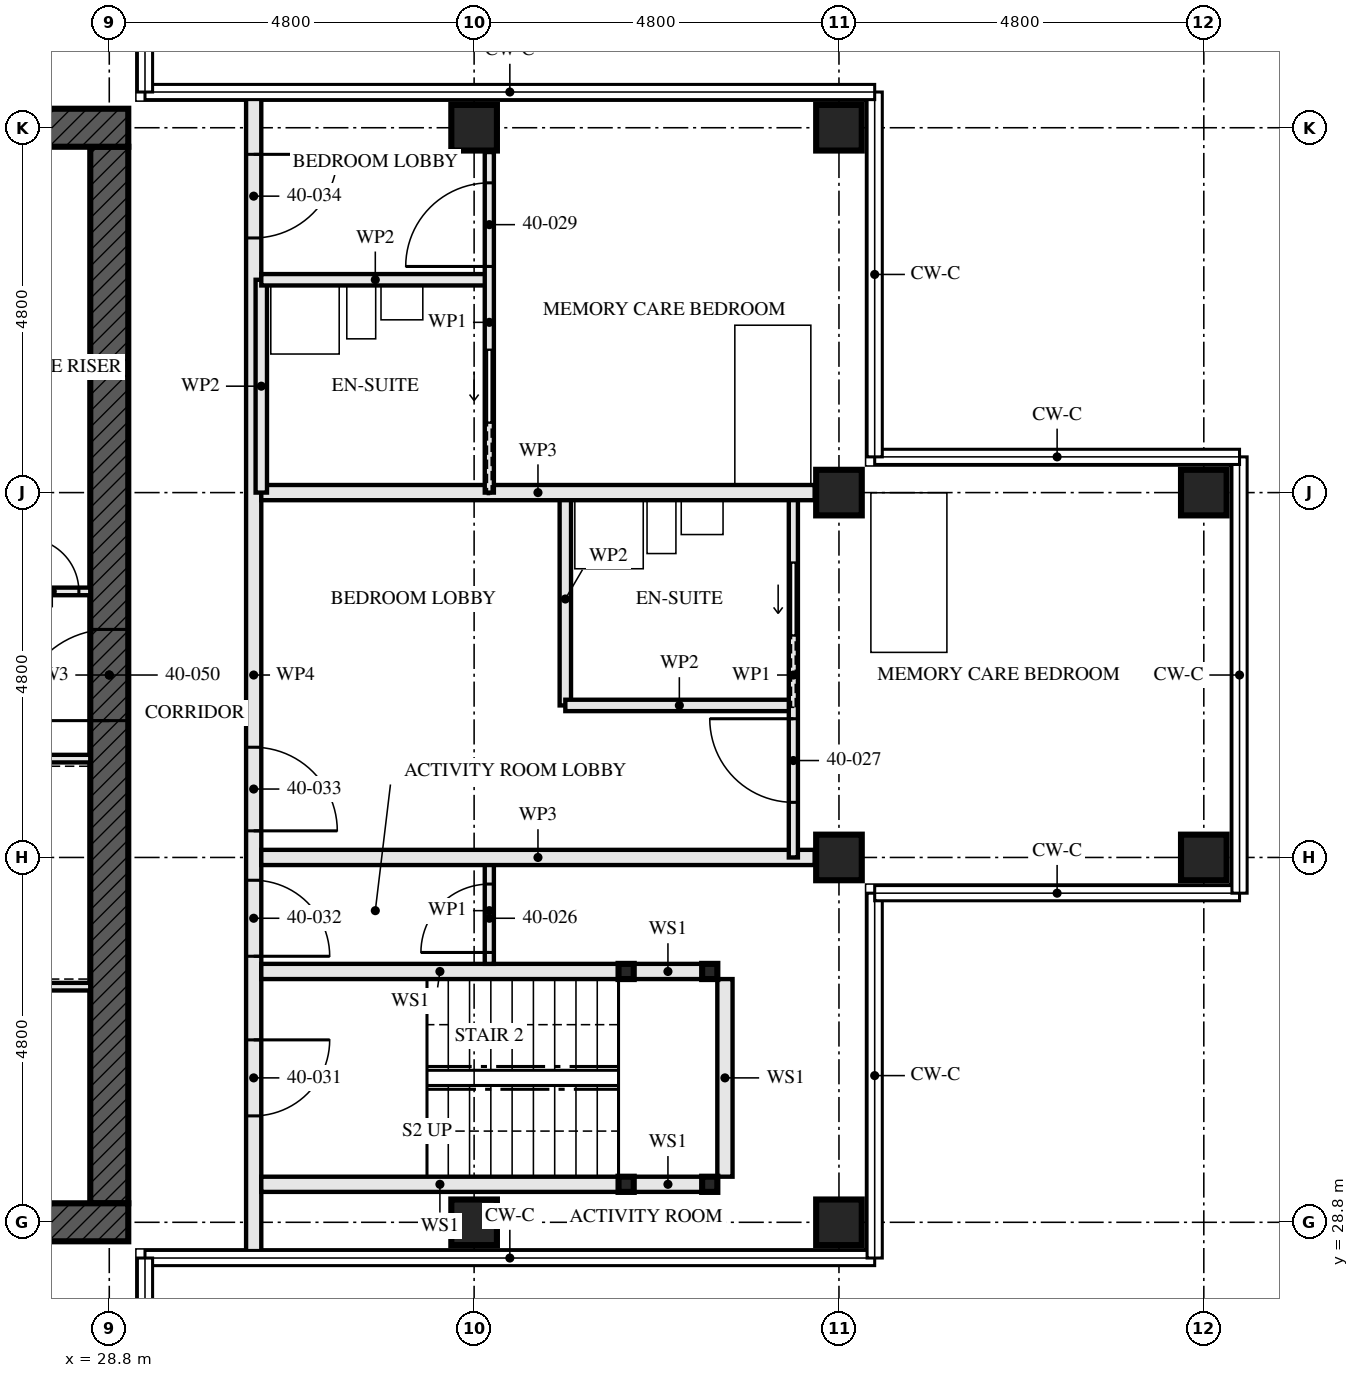
"""IFC4 building model, lengths in metres.
Left out: names, types, materials, properties, quantities, classifications, styles, units other than length and angle.
Written with IfcOpenShell. Run it as: python <this file> out.ifc"""

import sys

from ifc_helpers import new_model, si_unit, direction, frame, frame_2d, origin, origin_2d, place, context, subcontext, project, spatial, rectangle, hollow_rectangle, extrude, element, fill, save


model = new_model("IFC4")
c1 = context("Model", 3, precision=1e-05, world=origin(), true_north=direction((0.0, 1.0)))
c2 = subcontext(c1, "Body", "Model", "MODEL_VIEW")
j1 = project(units=[si_unit("LENGTHUNIT", "METRE"), si_unit("PLANEANGLEUNIT", "RADIAN")], contexts=[c1])
p1 = place(None, origin())
s1 = spatial("IfcSite", under=j1, at=p1, CompositionType="ELEMENT")
p2 = place(p1, origin())
s2 = spatial("IfcBuilding", under=s1, at=p2, CompositionType="ELEMENT")
p3 = place(p2, frame((0.0, 0.0, 148.0)))
s3 = spatial("IfcBuildingStorey", under=s2, at=p3, CompositionType="ELEMENT", Elevation=148.0)
for number, where, z_axis, x_axis in (
    (1, (33.6, 28.8, 0.0), (0.0, 0.0, 1.0), (0.0, 1.0, 0.0)),
    (2, (33.6, 43.2, 0.0), (0.0, 0.0, 1.0), (0.0, 1.0, 0.0)),
    (3, (38.4, 28.8, 0.0), (0.0, 0.0, 1.0), (0.0, 1.0, 0.0)),
    (4, (38.4, 33.6, 0.0), (0.0, 0.0, 1.0), (0.0, 1.0, 0.0)),
    (5, (38.4, 38.4, 0.0), (0.0, 0.0, 1.0), (0.0, 1.0, 0.0)),
    (6, (38.4, 43.2, 0.0), (0.0, 0.0, 1.0), (0.0, 1.0, 0.0)),
    (7, (43.2, 33.6, 0.0), (0.0, 0.0, 1.0), (0.0, 1.0, 0.0)),
    (8, (43.2, 38.4, 0.0), (0.0, 0.0, 1.0), (0.0, 1.0, 0.0)),
):
    element("IfcColumn", number, at=place(p3, frame(where, z_axis=z_axis, x_axis=x_axis)), inside=s3, PredefinedType="COLUMN", context=c2, shape_type="SweptSolid", body=[
        extrude(hollow_rectangle(XDim=0.6, YDim=0.6, WallThickness=0.08, at=origin_2d()), origin(), (0.0, 0.0, 1.0), 3.5),
    ])
p4 = place(p3, frame((14.15, 28.8, -0.17), z_axis=(0.0, 0.0, 1.0), x_axis=(1.0, 0.0, 0.0)))
e9 = element("IfcWall", 9, at=p4, inside=s3, PredefinedType="SHEAR", context=c2, shape_type="SweptSolid", body=[
    extrude(rectangle(XDim=14.9, YDim=0.5, at=frame_2d((7.45, 0.0))), origin(), (0.0, 0.0, 1.0), 3.5),
])
p5 = place(p4, frame((6.85, 0.0, 0.17)))
e10 = element("IfcOpeningElement", 10, at=p5, cuts=e9, PredefinedType="OPENING", context=c2, shape_type="SweptSolid", body=[
    extrude(rectangle(XDim=1.2, YDim=2.1, at=frame_2d((0.6, 1.05))), frame((0.0, 0.26, 0.0), z_axis=(0.0, -1.0, 0.0), x_axis=(1.0, 0.0, 0.0)), (0.0, 0.0, 1.0), 0.521),
])
p6 = place(p3, frame((29.05, 43.2, -0.17), z_axis=(0.0, 0.0, 1.0), x_axis=(-1.0, 0.0, 0.0)))
e11 = element("IfcWall", 11, at=p6, inside=s3, PredefinedType="SHEAR", context=c2, shape_type="SweptSolid", body=[
    extrude(rectangle(XDim=14.9, YDim=0.5, at=frame_2d((7.45, 0.0))), origin(), (0.0, 0.0, 1.0), 3.5),
])
p7 = place(p6, frame((6.85, 0.0, 0.17)))
e12 = element("IfcOpeningElement", 12, at=p7, cuts=e11, PredefinedType="OPENING", context=c2, shape_type="SweptSolid", body=[
    extrude(rectangle(XDim=1.2, YDim=2.1, at=frame_2d((0.6, 1.05))), frame((0.0, 0.26, 0.0), z_axis=(0.0, -1.0, 0.0), x_axis=(1.0, 0.0, 0.0)), (0.0, 0.0, 1.0), 0.521),
])
p8 = place(p3, frame((28.8, 29.05, -0.17), z_axis=(0.0, 0.0, 1.0), x_axis=(0.0, 1.0, 0.0)))
e13 = element("IfcWall", 13, at=p8, inside=s3, PredefinedType="SHEAR", context=c2, shape_type="SweptSolid", body=[
    extrude(rectangle(XDim=13.9, YDim=0.5, at=frame_2d((6.95, 0.0))), origin(), (0.0, 0.0, 1.0), 3.5),
])
p9 = place(p8, frame((6.35, 0.0, 0.17)))
e14 = element("IfcOpeningElement", 14, at=p9, cuts=e13, PredefinedType="OPENING", context=c2, shape_type="SweptSolid", body=[
    extrude(rectangle(XDim=1.2, YDim=2.1, at=frame_2d((0.6, 1.05))), frame((0.0, 0.26, 0.0), z_axis=(0.0, -1.0, 0.0), x_axis=(1.0, 0.0, 0.0)), (0.0, 0.0, 1.0), 0.521),
])
for number, where, z_axis, x_axis in (
    (15, (36.7, 29.3, 0.0), (0.0, 0.0, 1.0), (1.0, 0.0, 0.0)),
    (16, (36.7, 32.1, 0.0), (0.0, 0.0, 1.0), (1.0, 0.0, 0.0)),
    (17, (35.6, 29.3, 0.0), (0.0, 0.0, 1.0), (1.0, 0.0, 0.0)),
    (18, (35.6, 32.1, 0.0), (0.0, 0.0, 1.0), (1.0, 0.0, 0.0)),
):
    element("IfcColumn", number, at=place(p3, frame(where, z_axis=z_axis, x_axis=x_axis)), inside=s3, PredefinedType="COLUMN", context=c2, shape_type="SweptSolid", body=[
        extrude(hollow_rectangle(XDim=0.2, YDim=0.2, WallThickness=0.008, at=origin_2d()), origin(), (0.0, 0.0, 1.0), 3.33),
    ])
p10 = place(p3, frame((36.6, 29.3, 0.0), z_axis=(0.0, 0.0, 1.0), x_axis=(-1.0, 0.0, 0.0)))
e19 = element("IfcWall", 19, at=p10, inside=s3, PredefinedType="SOLIDWALL", context=c2, shape_type="SweptSolid", body=[
    extrude(rectangle(XDim=0.9, YDim=0.2, at=frame_2d((0.45, 0.0))), origin(), (0.0, 0.0, 1.0), 2.99),
])
p11 = place(p3, frame((35.5, 29.3, 0.0), z_axis=(0.0, 0.0, 1.0), x_axis=(-1.0, 0.0, 0.0)))
e20 = element("IfcWall", 20, at=p11, inside=s3, PredefinedType="SOLIDWALL", context=c2, shape_type="SweptSolid", body=[
    extrude(rectangle(XDim=4.7, YDim=0.2, at=frame_2d((2.35, 0.0))), origin(), (0.0, 0.0, 1.0), 2.99),
])
p12 = place(p3, frame((36.6, 32.1, 0.0), z_axis=(0.0, 0.0, 1.0), x_axis=(-1.0, 0.0, 0.0)))
e21 = element("IfcWall", 21, at=p12, inside=s3, PredefinedType="SOLIDWALL", context=c2, shape_type="SweptSolid", body=[
    extrude(rectangle(XDim=0.9, YDim=0.2, at=frame_2d((0.45, 0.0))), origin(), (0.0, 0.0, 1.0), 2.99),
])
p13 = place(p3, frame((35.5, 32.1, 0.0), z_axis=(0.0, 0.0, 1.0), x_axis=(-1.0, 0.0, 0.0)))
e22 = element("IfcWall", 22, at=p13, inside=s3, PredefinedType="SOLIDWALL", context=c2, shape_type="SweptSolid", body=[
    extrude(rectangle(XDim=4.7, YDim=0.2, at=frame_2d((2.35, 0.0))), origin(), (0.0, 0.0, 1.0), 2.99),
])
p14 = place(p3, frame((36.9, 29.4, 0.0), z_axis=(0.0, 0.0, 1.0), x_axis=(0.0, 1.0, 0.0)))
e23 = element("IfcWall", 23, at=p14, inside=s3, PredefinedType="SOLIDWALL", context=c2, shape_type="SweptSolid", body=[
    extrude(rectangle(XDim=2.6, YDim=0.2, at=frame_2d((1.3, 0.0))), origin(), (0.0, 0.0, 1.0), 3.33),
])
p15 = place(p3, frame((33.8, 32.2, 0.0), z_axis=(0.0, 0.0, 1.0), x_axis=(0.0, 1.0, 0.0)))
e24 = element("IfcWall", 24, at=p15, inside=s3, PredefinedType="PARTITIONING", context=c2, shape_type="SweptSolid", body=[
    extrude(rectangle(XDim=1.4, YDim=0.12, at=frame_2d((0.7, 0.0))), origin(), (0.0, 0.0, 1.0), 3.33),
])
p16 = place(p15, frame((0.15, 0.0, 0.0)))
e25 = element("IfcOpeningElement", 25, at=p16, cuts=e24, PredefinedType="OPENING", context=c2, shape_type="SweptSolid", body=[
    extrude(rectangle(XDim=0.9, YDim=2.1, at=frame_2d((0.45, 1.05))), frame((0.0, 0.071, 0.0), z_axis=(0.0, -1.0, 0.0), x_axis=(1.0, 0.0, 0.0)), (0.0, 0.0, 1.0), 0.141),
])
p17 = place(p3, frame((38.08, 33.6, 0.0), z_axis=(0.0, 0.0, 1.0), x_axis=(-1.0, 0.0, 0.0)))
e26 = element("IfcWall", 26, at=p17, inside=s3, PredefinedType="PARTITIONING", context=c2, shape_type="SweptSolid", body=[
    extrude(rectangle(XDim=7.28, YDim=0.2, at=frame_2d((3.64, 0.0))), origin(), (0.0, 0.0, 1.0), 2.55),
])
p18 = place(p3, frame((37.8, 35.6, 0.0), z_axis=(0.0, 0.0, 1.0), x_axis=(-1.0, 0.0, 0.0)))
e27 = element("IfcWall", 27, at=p18, inside=s3, PredefinedType="PARTITIONING", context=c2, shape_type="SweptSolid", body=[
    extrude(rectangle(XDim=3.0, YDim=0.15, at=frame_2d((1.5, 0.0))), origin(), (0.0, 0.0, 1.0), 3.33),
])
p19 = place(p3, frame((34.8, 35.6, 0.0), z_axis=(0.0, 0.0, 1.0), x_axis=(0.0, 1.0, 0.0)))
e28 = element("IfcWall", 28, at=p19, inside=s3, PredefinedType="PARTITIONING", context=c2, shape_type="SweptSolid", body=[
    extrude(rectangle(XDim=2.8, YDim=0.15, at=frame_2d((1.4, 0.0))), origin(), (0.0, 0.0, 1.0), 3.33),
])
p20 = place(p3, frame((37.8, 33.6, 0.0), z_axis=(0.0, 0.0, 1.0), x_axis=(0.0, 1.0, 0.0)))
e29 = element("IfcWall", 29, at=p20, inside=s3, PredefinedType="PARTITIONING", context=c2, shape_type="SweptSolid", body=[
    extrude(rectangle(XDim=4.8, YDim=0.12, at=frame_2d((2.4, 0.0))), origin(), (0.0, 0.0, 1.0), 3.33),
])
p21 = place(p20, frame((0.725, 0.0, 0.0)))
e30 = element("IfcOpeningElement", 30, at=p21, cuts=e29, PredefinedType="OPENING", context=c2, shape_type="SweptSolid", body=[
    extrude(rectangle(XDim=1.1, YDim=2.1, at=frame_2d((0.55, 1.05))), frame((0.0, 0.071, 0.0), z_axis=(0.0, -1.0, 0.0), x_axis=(1.0, 0.0, 0.0)), (0.0, 0.0, 1.0), 0.141),
])
p22 = place(p20, frame((2.925, 0.0, 0.0)))
e31 = element("IfcOpeningElement", 31, at=p22, cuts=e29, PredefinedType="OPENING", context=c2, shape_type="SweptSolid", body=[
    extrude(rectangle(XDim=0.95, YDim=2.1, at=frame_2d((0.475, 1.05))), frame((0.0, 0.071, 0.0), z_axis=(0.0, -1.0, 0.0), x_axis=(1.0, 0.0, 0.0)), (0.0, 0.0, 1.0), 0.141),
])
p23 = place(p3, frame((38.08, 38.4, 0.0), z_axis=(0.0, 0.0, 1.0), x_axis=(-1.0, 0.0, 0.0)))
e32 = element("IfcWall", 32, at=p23, inside=s3, PredefinedType="PARTITIONING", context=c2, shape_type="SweptSolid", body=[
    extrude(rectangle(XDim=7.28, YDim=0.2, at=frame_2d((3.64, 0.0))), origin(), (0.0, 0.0, 1.0), 2.55),
])
p24 = place(p3, frame((33.8, 41.2, 0.0), z_axis=(0.0, 0.0, 1.0), x_axis=(-1.0, 0.0, 0.0)))
e33 = element("IfcWall", 33, at=p24, inside=s3, PredefinedType="PARTITIONING", context=c2, shape_type="SweptSolid", body=[
    extrude(rectangle(XDim=3.0, YDim=0.15, at=frame_2d((1.5, 0.0))), origin(), (0.0, 0.0, 1.0), 3.33),
])
p25 = place(p3, frame((30.8, 38.4, 0.0), z_axis=(0.0, 0.0, 1.0), x_axis=(0.0, 1.0, 0.0)))
e34 = element("IfcWall", 34, at=p25, inside=s3, PredefinedType="PARTITIONING", context=c2, shape_type="SweptSolid", body=[
    extrude(rectangle(XDim=2.8, YDim=0.15, at=frame_2d((1.4, 0.0))), origin(), (0.0, 0.0, 1.0), 3.33),
])
p26 = place(p3, frame((33.8, 38.4, 0.0), z_axis=(0.0, 0.0, 1.0), x_axis=(0.0, 1.0, 0.0)))
e35 = element("IfcWall", 35, at=p26, inside=s3, PredefinedType="PARTITIONING", context=c2, shape_type="SweptSolid", body=[
    extrude(rectangle(XDim=4.48, YDim=0.12, at=frame_2d((2.24, 0.0))), origin(), (0.0, 0.0, 1.0), 3.33),
])
p27 = place(p26, frame((2.975, 0.0, 0.0)))
e36 = element("IfcOpeningElement", 36, at=p27, cuts=e35, PredefinedType="OPENING", context=c2, shape_type="SweptSolid", body=[
    extrude(rectangle(XDim=1.1, YDim=2.1, at=frame_2d((0.55, 1.05))), frame((0.0, 0.071, 0.0), z_axis=(0.0, -1.0, 0.0), x_axis=(1.0, 0.0, 0.0)), (0.0, 0.0, 1.0), 0.141),
])
p28 = place(p26, frame((0.925, 0.0, 0.0)))
e37 = element("IfcOpeningElement", 37, at=p28, cuts=e35, PredefinedType="OPENING", context=c2, shape_type="SweptSolid", body=[
    extrude(rectangle(XDim=0.95, YDim=2.1, at=frame_2d((0.475, 1.05))), frame((0.0, 0.071, 0.0), z_axis=(0.0, -1.0, 0.0), x_axis=(1.0, 0.0, 0.0)), (0.0, 0.0, 1.0), 0.141),
])
p29 = place(p3, frame((30.7, 28.35, 0.0), z_axis=(0.0, 0.0, 1.0), x_axis=(0.0, 1.0, 0.0)))
e38 = element("IfcWall", 38, at=p29, inside=s3, PredefinedType="PARTITIONING", context=c2, shape_type="SweptSolid", body=[
    extrude(rectangle(XDim=15.3, YDim=0.2, at=frame_2d((7.65, 0.0))), origin(), (0.0, 0.0, 1.0), 2.32),
])
p30 = place(p29, frame((1.85, 0.0, 0.0)))
e39 = element("IfcOpeningElement", 39, at=p30, cuts=e38, PredefinedType="OPENING", context=c2, shape_type="SweptSolid", body=[
    extrude(rectangle(XDim=1.0, YDim=2.1, at=frame_2d((0.5, 1.05))), frame((0.0, 0.111, 0.0), z_axis=(0.0, -1.0, 0.0), x_axis=(1.0, 0.0, 0.0)), (0.0, 0.0, 1.0), 0.221),
])
p31 = place(p29, frame((3.95, 0.0, 0.0)))
e40 = element("IfcOpeningElement", 40, at=p31, cuts=e38, PredefinedType="OPENING", context=c2, shape_type="SweptSolid", body=[
    extrude(rectangle(XDim=1.0, YDim=2.1, at=frame_2d((0.5, 1.05))), frame((0.0, 0.111, 0.0), z_axis=(0.0, -1.0, 0.0), x_axis=(1.0, 0.0, 0.0)), (0.0, 0.0, 1.0), 0.221),
])
p32 = place(p29, frame((5.6, 0.0, 0.0)))
e41 = element("IfcOpeningElement", 41, at=p32, cuts=e38, PredefinedType="OPENING", context=c2, shape_type="SweptSolid", body=[
    extrude(rectangle(XDim=1.1, YDim=2.1, at=frame_2d((0.55, 1.05))), frame((0.0, 0.111, 0.0), z_axis=(0.0, -1.0, 0.0), x_axis=(1.0, 0.0, 0.0)), (0.0, 0.0, 1.0), 0.221),
])
p33 = place(p29, frame((13.4, 0.0, 0.0)))
e42 = element("IfcOpeningElement", 42, at=p33, cuts=e38, PredefinedType="OPENING", context=c2, shape_type="SweptSolid", body=[
    extrude(rectangle(XDim=1.1, YDim=2.1, at=frame_2d((0.55, 1.05))), frame((0.0, 0.111, 0.0), z_axis=(0.0, -1.0, 0.0), x_axis=(1.0, 0.0, 0.0)), (0.0, 0.0, 1.0), 0.221),
])
p34 = place(p3, frame((23.05, 34.9, 0.0), z_axis=(0.0, 0.0, 1.0), x_axis=(1.0, 0.0, 0.0)))
e43 = element("IfcWall", 43, at=p34, inside=s3, PredefinedType="SOLIDWALL", context=c2, shape_type="SweptSolid", body=[
    extrude(rectangle(XDim=5.5, YDim=0.1, at=frame_2d((2.75, 0.0))), origin(), (0.0, 0.0, 1.0), 3.33),
])
p35 = place(p34, frame((0.85, 0.0, 0.0)))
e44 = element("IfcOpeningElement", 44, at=p35, cuts=e43, PredefinedType="OPENING", context=c2, shape_type="SweptSolid", body=[
    extrude(rectangle(XDim=1.0, YDim=2.1, at=frame_2d((0.5, 1.05))), frame((0.0, 0.061, 0.0), z_axis=(0.0, -1.0, 0.0), x_axis=(1.0, 0.0, 0.0)), (0.0, 0.0, 1.0), 0.121),
])
p36 = place(p34, frame((3.625, 0.0, 0.0)))
e45 = element("IfcOpeningElement", 45, at=p36, cuts=e43, PredefinedType="OPENING", context=c2, shape_type="SweptSolid", body=[
    extrude(rectangle(XDim=1.0, YDim=2.1, at=frame_2d((0.5, 1.05))), frame((0.0, 0.061, 0.0), z_axis=(0.0, -1.0, 0.0), x_axis=(1.0, 0.0, 0.0)), (0.0, 0.0, 1.0), 0.121),
])
p37 = place(p3, frame((22.65, 37.1, 0.0), z_axis=(0.0, 0.0, 1.0), x_axis=(1.0, 0.0, 0.0)))
e46 = element("IfcWall", 46, at=p37, inside=s3, PredefinedType="SOLIDWALL", context=c2, shape_type="SweptSolid", body=[
    extrude(rectangle(XDim=5.9, YDim=0.1, at=frame_2d((2.95, 0.0))), origin(), (0.0, 0.0, 1.0), 3.33),
])
p38 = place(p37, frame((3.5, 0.0, 0.0)))
e47 = element("IfcOpeningElement", 47, at=p38, cuts=e46, PredefinedType="OPENING", context=c2, shape_type="SweptSolid", body=[
    extrude(rectangle(XDim=0.9, YDim=2.1, at=frame_2d((0.45, 1.05))), frame((0.0, 0.061, 0.0), z_axis=(0.0, -1.0, 0.0), x_axis=(1.0, 0.0, 0.0)), (0.0, 0.0, 1.0), 0.121),
])
p39 = place(p37, frame((5.05, 0.0, 0.0)))
e48 = element("IfcOpeningElement", 48, at=p39, cuts=e46, PredefinedType="OPENING", context=c2, shape_type="SweptSolid", body=[
    extrude(rectangle(XDim=0.7, YDim=2.1, at=frame_2d((0.35, 1.05))), frame((0.0, 0.061, 0.0), z_axis=(0.0, -1.0, 0.0), x_axis=(1.0, 0.0, 0.0)), (0.0, 0.0, 1.0), 0.121),
])
p40 = place(p3, frame((23.15, 31.9, 0.0), z_axis=(0.0, 0.0, 1.0), x_axis=(1.0, 0.0, 0.0)))
e49 = element("IfcWall", 49, at=p40, inside=s3, PredefinedType="SOLIDWALL", context=c2, shape_type="SweptSolid", body=[
    extrude(rectangle(XDim=5.4, YDim=0.1, at=frame_2d((2.7, 0.0))), origin(), (0.0, 0.0, 1.0), 3.33),
])
p41 = place(p16, origin())
e50 = element("IfcDoor", 50, at=p41, inside=s3, OperationType="SINGLE_SWING_RIGHT", PredefinedType="DOOR", context=c2, shape_type="SweptSolid", body=[
    extrude(rectangle(XDim=0.9, YDim=2.1, at=frame_2d((0.45, 1.05))), frame((0.0, 0.022, 0.0), z_axis=(0.0, -1.0, 0.0), x_axis=(1.0, 0.0, 0.0)), (0.0, 0.0, 1.0), 0.044),
])
fill(e25, e50)
p42 = place(p21, origin())
e51 = element("IfcDoor", 51, at=p42, inside=s3, OperationType="SINGLE_SWING_LEFT", PredefinedType="DOOR", context=c2, shape_type="SweptSolid", body=[
    extrude(rectangle(XDim=1.1, YDim=2.1, at=frame_2d((0.55, 1.05))), frame((0.0, 0.022, 0.0), z_axis=(0.0, -1.0, 0.0), x_axis=(1.0, 0.0, 0.0)), (0.0, 0.0, 1.0), 0.044),
])
fill(e30, e51)
p43 = place(p22, origin())
e52 = element("IfcDoor", 52, at=p43, inside=s3, OperationType="SLIDING_TO_RIGHT", PredefinedType="DOOR", context=c2, shape_type="SweptSolid", body=[
    extrude(rectangle(XDim=0.95, YDim=2.1, at=frame_2d((0.475, 1.05))), frame((0.0, 0.022, 0.0), z_axis=(0.0, -1.0, 0.0), x_axis=(1.0, 0.0, 0.0)), (0.0, 0.0, 1.0), 0.044),
])
fill(e31, e52)
p44 = place(p27, origin())
e53 = element("IfcDoor", 53, at=p44, inside=s3, OperationType="SINGLE_SWING_RIGHT", PredefinedType="DOOR", context=c2, shape_type="SweptSolid", body=[
    extrude(rectangle(XDim=1.1, YDim=2.1, at=frame_2d((0.55, 1.05))), frame((0.0, 0.022, 0.0), z_axis=(0.0, -1.0, 0.0), x_axis=(1.0, 0.0, 0.0)), (0.0, 0.0, 1.0), 0.044),
])
fill(e36, e53)
p45 = place(p28, origin())
e54 = element("IfcDoor", 54, at=p45, inside=s3, OperationType="SLIDING_TO_RIGHT", PredefinedType="DOOR", context=c2, shape_type="SweptSolid", body=[
    extrude(rectangle(XDim=0.95, YDim=2.1, at=frame_2d((0.475, 1.05))), frame((0.0, 0.022, 0.0), z_axis=(0.0, -1.0, 0.0), x_axis=(1.0, 0.0, 0.0)), (0.0, 0.0, 1.0), 0.044),
])
fill(e37, e54)
p46 = place(p30, frame((1.0, 0.0, 0.0), z_axis=(0.0, 0.0, 1.0), x_axis=(-1.0, 0.0, 0.0)))
e55 = element("IfcDoor", 55, at=p46, inside=s3, OperationType="SINGLE_SWING_RIGHT", PredefinedType="DOOR", context=c2, shape_type="SweptSolid", body=[
    extrude(rectangle(XDim=1.0, YDim=2.1, at=frame_2d((0.5, 1.05))), frame((0.0, 0.032, 0.0), z_axis=(0.0, -1.0, 0.0), x_axis=(1.0, 0.0, 0.0)), (0.0, 0.0, 1.0), 0.064),
])
fill(e39, e55)
p47 = place(p31, frame((1.0, 0.0, 0.0), z_axis=(0.0, 0.0, 1.0), x_axis=(-1.0, 0.0, 0.0)))
e56 = element("IfcDoor", 56, at=p47, inside=s3, OperationType="SINGLE_SWING_LEFT", PredefinedType="DOOR", context=c2, shape_type="SweptSolid", body=[
    extrude(rectangle(XDim=1.0, YDim=2.1, at=frame_2d((0.5, 1.05))), frame((0.0, 0.027, 0.0), z_axis=(0.0, -1.0, 0.0), x_axis=(1.0, 0.0, 0.0)), (0.0, 0.0, 1.0), 0.054),
])
fill(e40, e56)
p48 = place(p32, frame((1.1, 0.0, 0.0), z_axis=(0.0, 0.0, 1.0), x_axis=(-1.0, 0.0, 0.0)))
e57 = element("IfcDoor", 57, at=p48, inside=s3, OperationType="SINGLE_SWING_LEFT", PredefinedType="DOOR", context=c2, shape_type="SweptSolid", body=[
    extrude(rectangle(XDim=1.1, YDim=2.1, at=frame_2d((0.55, 1.05))), frame((0.0, 0.027, 0.0), z_axis=(0.0, -1.0, 0.0), x_axis=(1.0, 0.0, 0.0)), (0.0, 0.0, 1.0), 0.054),
])
fill(e41, e57)
p49 = place(p33, frame((1.1, 0.0, 0.0), z_axis=(0.0, 0.0, 1.0), x_axis=(-1.0, 0.0, 0.0)))
e58 = element("IfcDoor", 58, at=p49, inside=s3, OperationType="SINGLE_SWING_RIGHT", PredefinedType="DOOR", context=c2, shape_type="SweptSolid", body=[
    extrude(rectangle(XDim=1.1, YDim=2.1, at=frame_2d((0.55, 1.05))), frame((0.0, 0.027, 0.0), z_axis=(0.0, -1.0, 0.0), x_axis=(1.0, 0.0, 0.0)), (0.0, 0.0, 1.0), 0.054),
])
fill(e42, e58)
p50 = place(p39, origin())
e59 = element("IfcDoor", 59, at=p50, inside=s3, OperationType="SINGLE_SWING_RIGHT", PredefinedType="DOOR", context=c2, shape_type="SweptSolid", body=[
    extrude(rectangle(XDim=0.7, YDim=2.1, at=frame_2d((0.35, 1.05))), frame((0.0, 0.027, 0.0), z_axis=(0.0, -1.0, 0.0), x_axis=(1.0, 0.0, 0.0)), (0.0, 0.0, 1.0), 0.054),
])
fill(e48, e59)
p51 = place(p9, origin())
e60 = element("IfcDoor", 60, at=p51, inside=s3, OperationType="SINGLE_SWING_LEFT", PredefinedType="DOOR", context=c2, shape_type="SweptSolid", body=[
    extrude(rectangle(XDim=1.2, YDim=2.1, at=frame_2d((0.6, 1.05))), frame((0.0, 0.027, 0.0), z_axis=(0.0, -1.0, 0.0), x_axis=(1.0, 0.0, 0.0)), (0.0, 0.0, 1.0), 0.054),
])
fill(e14, e60)
save(model, sys.argv[1])
